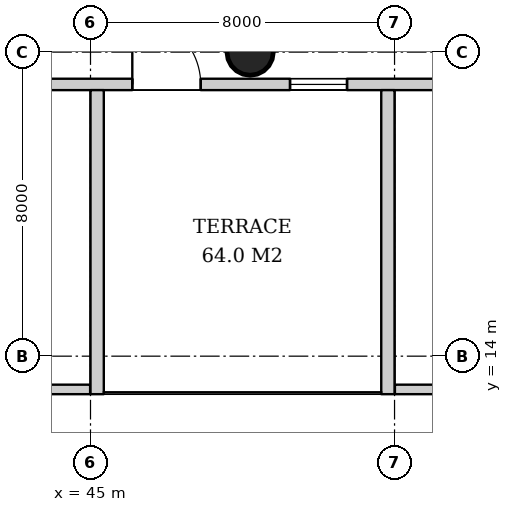
"""IFC4 building model, lengths in metres.
Left out: names, types, materials, properties, quantities, classifications, styles, units other than length and angle.
Written with IfcOpenShell. Run it as: python <this file> out.ifc"""

import sys

from ifc_helpers import new_model, si_unit, direction, frame, frame_2d, origin, origin_2d, place, context, subcontext, project, spatial, rectangle, hollow_circle, extrude, element, fill, save


model = new_model("IFC4")
c1 = context("Model", 3, precision=1e-05, world=origin(), true_north=direction((0.0, 1.0)))
c2 = subcontext(c1, "Body", "Model", "MODEL_VIEW")
j1 = project(units=[si_unit("LENGTHUNIT", "METRE"), si_unit("PLANEANGLEUNIT", "RADIAN")], contexts=[c1])
p1 = place(None, origin())
s1 = spatial("IfcSite", under=j1, at=p1, CompositionType="ELEMENT")
p2 = place(p1, origin())
s2 = spatial("IfcBuilding", under=s1, at=p2, CompositionType="ELEMENT")
p3 = place(p2, frame((0.0, 0.0, 11.0)))
s3 = spatial("IfcBuildingStorey", under=s2, at=p3, CompositionType="ELEMENT", Elevation=11.0)
p4 = place(p3, frame((49.2, 22.0, 0.0), z_axis=(0.0, 0.0, 1.0), x_axis=(1.0, 0.0, 0.0)))
e1 = element("IfcColumn", 1, at=p4, inside=s3, PredefinedType="COLUMN", context=c2, shape_type="SweptSolid", body=[
    extrude(hollow_circle(Radius=0.61, WallThickness=0.04, at=origin_2d()), origin(), (0.0, 0.0, 1.0), 5.0),
])
p5 = place(p3, frame((20.0, 21.15, 0.0), z_axis=(0.0, 0.0, 1.0), x_axis=(1.0, 0.0, 0.0)))
e2 = element("IfcWall", 2, at=p5, inside=s3, PredefinedType="SOLIDWALL", context=c2, shape_type="SweptSolid", body=[
    extrude(rectangle(XDim=58.0, YDim=0.3, at=frame_2d((29.0, 0.0))), origin(), (0.0, 0.0, 1.0), 4.7),
])
p6 = place(p5, frame((1.5, 0.0, 0.9)))
e3 = element("IfcOpeningElement", 3, at=p6, cuts=e2, PredefinedType="OPENING", context=c2, shape_type="SweptSolid", body=[
    extrude(rectangle(XDim=1.5, YDim=3.2, at=frame_2d((0.75, 1.6))), frame((0.0, 0.16, 0.0), z_axis=(0.0, -1.0, 0.0), x_axis=(1.0, 0.0, 0.0)), (0.0, 0.0, 1.0), 0.32),
])
p7 = place(p5, frame((6.0, 0.0, 0.9)))
e4 = element("IfcOpeningElement", 4, at=p7, cuts=e2, PredefinedType="OPENING", context=c2, shape_type="SweptSolid", body=[
    extrude(rectangle(XDim=1.5, YDim=3.2, at=frame_2d((0.75, 1.6))), frame((0.0, 0.16, 0.0), z_axis=(0.0, -1.0, 0.0), x_axis=(1.0, 0.0, 0.0)), (0.0, 0.0, 1.0), 0.32),
])
p8 = place(p5, frame((10.25, 0.0, 0.9)))
e5 = element("IfcOpeningElement", 5, at=p8, cuts=e2, PredefinedType="OPENING", context=c2, shape_type="SweptSolid", body=[
    extrude(rectangle(XDim=1.5, YDim=3.2, at=frame_2d((0.75, 1.6))), frame((0.0, 0.16, 0.0), z_axis=(0.0, -1.0, 0.0), x_axis=(1.0, 0.0, 0.0)), (0.0, 0.0, 1.0), 0.32),
])
p9 = place(p5, frame((14.25, 0.0, 0.9)))
e6 = element("IfcOpeningElement", 6, at=p9, cuts=e2, PredefinedType="OPENING", context=c2, shape_type="SweptSolid", body=[
    extrude(rectangle(XDim=1.5, YDim=3.2, at=frame_2d((0.75, 1.6))), frame((0.0, 0.16, 0.0), z_axis=(0.0, -1.0, 0.0), x_axis=(1.0, 0.0, 0.0)), (0.0, 0.0, 1.0), 0.32),
])
p10 = place(p5, frame((18.25, 0.0, 0.9)))
e7 = element("IfcOpeningElement", 7, at=p10, cuts=e2, PredefinedType="OPENING", context=c2, shape_type="SweptSolid", body=[
    extrude(rectangle(XDim=1.5, YDim=3.2, at=frame_2d((0.75, 1.6))), frame((0.0, 0.16, 0.0), z_axis=(0.0, -1.0, 0.0), x_axis=(1.0, 0.0, 0.0)), (0.0, 0.0, 1.0), 0.32),
])
p11 = place(p5, frame((22.25, 0.0, 0.9)))
e8 = element("IfcOpeningElement", 8, at=p11, cuts=e2, PredefinedType="OPENING", context=c2, shape_type="SweptSolid", body=[
    extrude(rectangle(XDim=1.5, YDim=3.2, at=frame_2d((0.75, 1.6))), frame((0.0, 0.16, 0.0), z_axis=(0.0, -1.0, 0.0), x_axis=(1.0, 0.0, 0.0)), (0.0, 0.0, 1.0), 0.32),
])
p12 = place(p5, frame((26.1, 0.0, 0.0)))
e9 = element("IfcOpeningElement", 9, at=p12, cuts=e2, PredefinedType="OPENING", context=c2, shape_type="SweptSolid", body=[
    extrude(rectangle(XDim=1.8, YDim=2.4, at=frame_2d((0.9, 1.2))), frame((0.0, 0.16, 0.0), z_axis=(0.0, -1.0, 0.0), x_axis=(1.0, 0.0, 0.0)), (0.0, 0.0, 1.0), 0.32),
])
p13 = place(p5, frame((30.25, 0.0, 0.9)))
e10 = element("IfcOpeningElement", 10, at=p13, cuts=e2, PredefinedType="OPENING", context=c2, shape_type="SweptSolid", body=[
    extrude(rectangle(XDim=1.5, YDim=3.2, at=frame_2d((0.75, 1.6))), frame((0.0, 0.16, 0.0), z_axis=(0.0, -1.0, 0.0), x_axis=(1.0, 0.0, 0.0)), (0.0, 0.0, 1.0), 0.32),
])
p14 = place(p5, frame((34.25, 0.0, 0.9)))
e11 = element("IfcOpeningElement", 11, at=p14, cuts=e2, PredefinedType="OPENING", context=c2, shape_type="SweptSolid", body=[
    extrude(rectangle(XDim=1.5, YDim=3.2, at=frame_2d((0.75, 1.6))), frame((0.0, 0.16, 0.0), z_axis=(0.0, -1.0, 0.0), x_axis=(1.0, 0.0, 0.0)), (0.0, 0.0, 1.0), 0.32),
])
p15 = place(p5, frame((38.25, 0.0, 0.9)))
e12 = element("IfcOpeningElement", 12, at=p15, cuts=e2, PredefinedType="OPENING", context=c2, shape_type="SweptSolid", body=[
    extrude(rectangle(XDim=1.5, YDim=3.2, at=frame_2d((0.75, 1.6))), frame((0.0, 0.16, 0.0), z_axis=(0.0, -1.0, 0.0), x_axis=(1.0, 0.0, 0.0)), (0.0, 0.0, 1.0), 0.32),
])
p16 = place(p5, frame((42.25, 0.0, 0.9)))
e13 = element("IfcOpeningElement", 13, at=p16, cuts=e2, PredefinedType="OPENING", context=c2, shape_type="SweptSolid", body=[
    extrude(rectangle(XDim=1.5, YDim=3.2, at=frame_2d((0.75, 1.6))), frame((0.0, 0.16, 0.0), z_axis=(0.0, -1.0, 0.0), x_axis=(1.0, 0.0, 0.0)), (0.0, 0.0, 1.0), 0.32),
])
p17 = place(p5, frame((46.25, 0.0, 0.9)))
e14 = element("IfcOpeningElement", 14, at=p17, cuts=e2, PredefinedType="OPENING", context=c2, shape_type="SweptSolid", body=[
    extrude(rectangle(XDim=1.5, YDim=3.2, at=frame_2d((0.75, 1.6))), frame((0.0, 0.16, 0.0), z_axis=(0.0, -1.0, 0.0), x_axis=(1.0, 0.0, 0.0)), (0.0, 0.0, 1.0), 0.32),
])
p18 = place(p5, frame((50.5, 0.0, 0.9)))
e15 = element("IfcOpeningElement", 15, at=p18, cuts=e2, PredefinedType="OPENING", context=c2, shape_type="SweptSolid", body=[
    extrude(rectangle(XDim=1.5, YDim=3.2, at=frame_2d((0.75, 1.6))), frame((0.0, 0.16, 0.0), z_axis=(0.0, -1.0, 0.0), x_axis=(1.0, 0.0, 0.0)), (0.0, 0.0, 1.0), 0.32),
])
p19 = place(p5, frame((55.0, 0.0, 0.9)))
e16 = element("IfcOpeningElement", 16, at=p19, cuts=e2, PredefinedType="OPENING", context=c2, shape_type="SweptSolid", body=[
    extrude(rectangle(XDim=1.5, YDim=3.2, at=frame_2d((0.75, 1.6))), frame((0.0, 0.16, 0.0), z_axis=(0.0, -1.0, 0.0), x_axis=(1.0, 0.0, 0.0)), (0.0, 0.0, 1.0), 0.32),
])
p20 = place(p3, frame((12.0, 13.125, 0.0), z_axis=(0.0, 0.0, 1.0), x_axis=(1.0, 0.0, 0.0)))
e17 = element("IfcWall", 17, at=p20, inside=s3, PredefinedType="PARAPET", context=c2, shape_type="SweptSolid", body=[
    extrude(rectangle(XDim=32.99, YDim=0.25, at=frame_2d((16.495, 0.0))), origin(), (0.0, 0.0, 1.0), 1.1),
])
p21 = place(p3, frame((53.01, 13.125, 0.0), z_axis=(0.0, 0.0, 1.0), x_axis=(1.0, 0.0, 0.0)))
e18 = element("IfcWall", 18, at=p21, inside=s3, PredefinedType="PARAPET", context=c2, shape_type="SweptSolid", body=[
    extrude(rectangle(XDim=24.99, YDim=0.25, at=frame_2d((12.495, 0.0))), origin(), (0.0, 0.0, 1.0), 1.1),
])
for number, where, z_axis, x_axis in (
    (19, (45.175, 13.0, 0.0), (0.0, 0.0, 1.0), (0.0, 1.0, 0.0)),
    (20, (52.825, 13.0, 0.0), (0.0, 0.0, 1.0), (0.0, 1.0, 0.0)),
):
    element("IfcWall", number, at=place(p3, frame(where, z_axis=z_axis, x_axis=x_axis)), inside=s3, PredefinedType="PARAPET", context=c2, shape_type="SweptSolid", body=[
        extrude(rectangle(XDim=8.0, YDim=0.35, at=frame_2d((4.0, 0.0))), origin(), (0.0, 0.0, 1.0), 1.1),
    ])
p22 = place(p12, origin())
e21 = element("IfcDoor", 21, at=p22, inside=s3, OperationType="DOUBLE_DOOR_SINGLE_SWING", PredefinedType="DOOR", context=c2, shape_type="SweptSolid", body=[
    extrude(rectangle(XDim=1.8, YDim=2.4, at=frame_2d((0.9, 1.2))), frame((0.0, 0.025, 0.0), z_axis=(0.0, -1.0, 0.0), x_axis=(1.0, 0.0, 0.0)), (0.0, 0.0, 1.0), 0.05),
])
fill(e9, e21)
p23 = place(p13, origin())
e22 = element("IfcWindow", 22, at=p23, inside=s3, PartitioningType="SINGLE_PANEL", PredefinedType="WINDOW", context=c2, shape_type="SweptSolid", body=[
    extrude(rectangle(XDim=1.5, YDim=3.2, at=frame_2d((0.75, 1.6))), frame((0.0, 0.03, 0.0), z_axis=(0.0, -1.0, 0.0), x_axis=(1.0, 0.0, 0.0)), (0.0, 0.0, 1.0), 0.06),
])
fill(e10, e22)
save(model, sys.argv[1])
